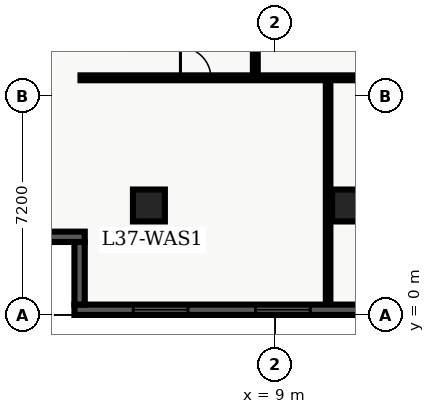
"""IFC4 building model, lengths in metres.
Left out: names, types, materials, properties, quantities, classifications, styles, units other than length and angle.
Written with IfcOpenShell. Run it as: python <this file> out.ifc"""

import sys

from ifc_helpers import new_model, entity, si_unit, converted_unit, direction, frame, origin_with_axes, origin_2d_with_axis, place, context, subcontext, project, spatial, polyline, rectangle, outline, extrude, element, fill, save


model = new_model("IFC4")
c1 = context("Model", 3, precision=1e-05, world=origin_with_axes(), true_north=direction((0.0, 1.0)))
c2 = subcontext(c1, "Body", "Model", "MODEL_VIEW")
j1 = project(units=[si_unit("LENGTHUNIT", "METRE"), converted_unit("PLANEANGLEUNIT", "DEGREE", entity("IfcPlaneAngleMeasure", 0.017), si_unit("PLANEANGLEUNIT", "RADIAN"), dimensions=[0, 0, 0, 0, 0, 0, 0])], contexts=[c1])
p1 = place(None, origin_with_axes())
s1 = spatial("IfcSite", under=j1, at=p1, CompositionType="ELEMENT")
p2 = place(p1, origin_with_axes())
s2 = spatial("IfcBuilding", under=s1, at=p2, CompositionType="ELEMENT")
p3 = place(p2, frame((0.0, 0.0, 152.4), z_axis=(0.0, 0.0, 1.0), x_axis=(1.0, 0.0, 0.0)))
s3 = spatial("IfcBuildingStorey", under=s2, at=p3, CompositionType="ELEMENT", Elevation=152.4)
for number, where, z_axis, x_axis in (
    (1, (11.4, 3.6, 0.0), (0.0, 0.0, 1.0), (1.0, 0.0, 0.0)),
    (2, (4.85, 3.6, 0.0), (0.0, 0.0, 1.0), (1.0, 0.0, 0.0)),
):
    element("IfcColumn", number, at=place(p3, frame(where, z_axis=z_axis, x_axis=x_axis)), inside=s3, PredefinedType="COLUMN", context=c2, shape_type="SweptSolid", body=[
        extrude(rectangle(XDim=1.05, YDim=1.05, at=origin_2d_with_axis()), origin_with_axes(), (0.0, 0.0, 1.0), 3.9),
    ])
p4 = place(p3, frame((2.6, 7.8, 0.0), z_axis=(0.0, 0.0, 1.0), x_axis=(1.0, 0.0, 0.0)))
e3 = element("IfcWall", 3, at=p4, inside=s3, PredefinedType="PARTITIONING", context=c2, shape_type="SweptSolid", body=[
    extrude(outline(polyline([(0.0, -0.08), (18.55, -0.08), (18.55, 0.08), (0.0, 0.08), (0.0, -0.08)])), origin_with_axes(), (0.0, 0.0, 1.0), 2.7),
])
p5 = place(p4, frame((3.787, 0.0, 0.0), z_axis=(0.0, 0.0, 1.0), x_axis=(1.0, 0.0, 0.0)))
e4 = element("IfcOpeningElement", 4, at=p5, cuts=e3, PredefinedType="OPENING", context=c2, shape_type="SweptSolid", body=[
    extrude(rectangle(XDim=1.0, YDim=0.18, at=origin_2d_with_axis()), origin_with_axes(), (0.0, 0.0, 1.0), 2.15),
])
p6 = place(p4, frame((13.322, 0.0, 0.0), z_axis=(0.0, 0.0, 1.0), x_axis=(1.0, 0.0, 0.0)))
e5 = element("IfcOpeningElement", 5, at=p6, cuts=e3, PredefinedType="OPENING", context=c2, shape_type="SweptSolid", body=[
    extrude(rectangle(XDim=1.0, YDim=0.18, at=origin_2d_with_axis()), origin_with_axes(), (0.0, 0.0, 1.0), 2.15),
])
p7 = place(p3, frame((8.35, 7.8, 0.0), z_axis=(0.0, 0.0, 1.0), x_axis=(0.0, 1.0, 0.0)))
e6 = element("IfcWall", 6, at=p7, inside=s3, PredefinedType="PARTITIONING", context=c2, shape_type="SweptSolid", body=[
    extrude(outline(polyline([(0.0, -0.08), (12.6, -0.08), (12.6, 0.08), (0.0, 0.08), (0.0, -0.08)])), origin_with_axes(), (0.0, 0.0, 1.0), 2.7),
])
p8 = place(p7, frame((2.92, 0.0, 0.0), z_axis=(0.0, 0.0, 1.0), x_axis=(1.0, 0.0, 0.0)))
e7 = element("IfcOpeningElement", 7, at=p8, cuts=e6, PredefinedType="OPENING", context=c2, shape_type="SweptSolid", body=[
    extrude(rectangle(XDim=1.0, YDim=0.18, at=origin_2d_with_axis()), origin_with_axes(), (0.0, 0.0, 1.0), 2.15),
])
p9 = place(p7, frame((9.115, 0.0, 0.0), z_axis=(0.0, 0.0, 1.0), x_axis=(1.0, 0.0, 0.0)))
e8 = element("IfcOpeningElement", 8, at=p9, cuts=e6, PredefinedType="OPENING", context=c2, shape_type="SweptSolid", body=[
    extrude(rectangle(XDim=1.0, YDim=0.18, at=origin_2d_with_axis()), origin_with_axes(), (0.0, 0.0, 1.0), 2.15),
])
p10 = place(p3, frame((10.744, 0.335, 0.0), z_axis=(0.0, 0.0, 1.0), x_axis=(0.0, 1.0, 0.0)))
e9 = element("IfcWall", 9, at=p10, inside=s3, PredefinedType="PARTITIONING", context=c2, shape_type="SweptSolid", body=[
    extrude(outline(polyline([(0.0, -0.075), (7.365, -0.075), (7.365, 0.075), (0.0, 0.075), (0.0, -0.075)])), origin_with_axes(), (0.0, 0.0, 1.0), 2.7),
])
p11 = place(p3, frame((57.26, 0.17, 0.0), z_axis=(0.0, 0.0, 1.0), x_axis=(-1.0, 0.0, 0.0)))
e10 = element("IfcWall", 10, at=p11, inside=s3, PredefinedType="SOLIDWALL", context=c2, shape_type="SweptSolid", body=[
    extrude(outline(polyline([(0.0, -0.17), (54.86, -0.17), (54.86, 0.17), (0.0, 0.17), (0.0, -0.17)])), origin_with_axes(), (0.0, 0.0, 1.0), 3.66),
])
p12 = place(p11, frame((2.836, 0.0, 0.45), z_axis=(0.0, 0.0, 1.0), x_axis=(1.0, 0.0, 0.0)))
e11 = element("IfcOpeningElement", 11, at=p12, cuts=e10, PredefinedType="OPENING", context=c2, shape_type="SweptSolid", body=[
    extrude(rectangle(XDim=1.8, YDim=0.36, at=origin_2d_with_axis()), origin_with_axes(), (0.0, 0.0, 1.0), 2.1),
])
p13 = place(p11, frame((7.307, 0.0, 0.45), z_axis=(0.0, 0.0, 1.0), x_axis=(1.0, 0.0, 0.0)))
e12 = element("IfcOpeningElement", 12, at=p13, cuts=e10, PredefinedType="OPENING", context=c2, shape_type="SweptSolid", body=[
    extrude(rectangle(XDim=1.8, YDim=0.36, at=origin_2d_with_axis()), origin_with_axes(), (0.0, 0.0, 1.0), 2.1),
])
p14 = place(p11, frame((11.779, 0.0, 0.45), z_axis=(0.0, 0.0, 1.0), x_axis=(1.0, 0.0, 0.0)))
e13 = element("IfcOpeningElement", 13, at=p14, cuts=e10, PredefinedType="OPENING", context=c2, shape_type="SweptSolid", body=[
    extrude(rectangle(XDim=1.8, YDim=0.36, at=origin_2d_with_axis()), origin_with_axes(), (0.0, 0.0, 1.0), 2.1),
])
p15 = place(p11, frame((16.251, 0.0, 0.45), z_axis=(0.0, 0.0, 1.0), x_axis=(1.0, 0.0, 0.0)))
e14 = element("IfcOpeningElement", 14, at=p15, cuts=e10, PredefinedType="OPENING", context=c2, shape_type="SweptSolid", body=[
    extrude(rectangle(XDim=1.8, YDim=0.36, at=origin_2d_with_axis()), origin_with_axes(), (0.0, 0.0, 1.0), 2.1),
])
p16 = place(p11, frame((20.723, 0.0, 0.45), z_axis=(0.0, 0.0, 1.0), x_axis=(1.0, 0.0, 0.0)))
e15 = element("IfcOpeningElement", 15, at=p16, cuts=e10, PredefinedType="OPENING", context=c2, shape_type="SweptSolid", body=[
    extrude(rectangle(XDim=1.8, YDim=0.36, at=origin_2d_with_axis()), origin_with_axes(), (0.0, 0.0, 1.0), 2.1),
])
p17 = place(p11, frame((25.194, 0.0, 0.45), z_axis=(0.0, 0.0, 1.0), x_axis=(1.0, 0.0, 0.0)))
e16 = element("IfcOpeningElement", 16, at=p17, cuts=e10, PredefinedType="OPENING", context=c2, shape_type="SweptSolid", body=[
    extrude(rectangle(XDim=1.8, YDim=0.36, at=origin_2d_with_axis()), origin_with_axes(), (0.0, 0.0, 1.0), 2.1),
])
p18 = place(p11, frame((29.666, 0.0, 0.45), z_axis=(0.0, 0.0, 1.0), x_axis=(1.0, 0.0, 0.0)))
e17 = element("IfcOpeningElement", 17, at=p18, cuts=e10, PredefinedType="OPENING", context=c2, shape_type="SweptSolid", body=[
    extrude(rectangle(XDim=1.8, YDim=0.36, at=origin_2d_with_axis()), origin_with_axes(), (0.0, 0.0, 1.0), 2.1),
])
p19 = place(p11, frame((34.138, 0.0, 0.45), z_axis=(0.0, 0.0, 1.0), x_axis=(1.0, 0.0, 0.0)))
e18 = element("IfcOpeningElement", 18, at=p19, cuts=e10, PredefinedType="OPENING", context=c2, shape_type="SweptSolid", body=[
    extrude(rectangle(XDim=1.8, YDim=0.36, at=origin_2d_with_axis()), origin_with_axes(), (0.0, 0.0, 1.0), 2.1),
])
p20 = place(p11, frame((38.609, 0.0, 0.45), z_axis=(0.0, 0.0, 1.0), x_axis=(1.0, 0.0, 0.0)))
e19 = element("IfcOpeningElement", 19, at=p20, cuts=e10, PredefinedType="OPENING", context=c2, shape_type="SweptSolid", body=[
    extrude(rectangle(XDim=1.8, YDim=0.36, at=origin_2d_with_axis()), origin_with_axes(), (0.0, 0.0, 1.0), 2.1),
])
p21 = place(p11, frame((43.081, 0.0, 0.45), z_axis=(0.0, 0.0, 1.0), x_axis=(1.0, 0.0, 0.0)))
e20 = element("IfcOpeningElement", 20, at=p21, cuts=e10, PredefinedType="OPENING", context=c2, shape_type="SweptSolid", body=[
    extrude(rectangle(XDim=1.8, YDim=0.36, at=origin_2d_with_axis()), origin_with_axes(), (0.0, 0.0, 1.0), 2.1),
])
p22 = place(p11, frame((48.003, 0.0, 0.45), z_axis=(0.0, 0.0, 1.0), x_axis=(1.0, 0.0, 0.0)))
e21 = element("IfcOpeningElement", 21, at=p22, cuts=e10, PredefinedType="OPENING", context=c2, shape_type="SweptSolid", body=[
    extrude(rectangle(XDim=1.8, YDim=0.36, at=origin_2d_with_axis()), origin_with_axes(), (0.0, 0.0, 1.0), 2.1),
])
p23 = place(p11, frame((52.024, 0.0, 0.45), z_axis=(0.0, 0.0, 1.0), x_axis=(1.0, 0.0, 0.0)))
e22 = element("IfcOpeningElement", 22, at=p23, cuts=e10, PredefinedType="OPENING", context=c2, shape_type="SweptSolid", body=[
    extrude(rectangle(XDim=1.8, YDim=0.36, at=origin_2d_with_axis()), origin_with_axes(), (0.0, 0.0, 1.0), 2.1),
])
p24 = place(p3, frame((2.57, 0.34, 0.0), z_axis=(0.0, 0.0, 1.0), x_axis=(0.0, 1.0, 0.0)))
e23 = element("IfcWall", 23, at=p24, inside=s3, PredefinedType="SOLIDWALL", context=c2, shape_type="SweptSolid", body=[
    extrude(outline(polyline([(0.0, -0.17), (2.06, -0.17), (2.06, 0.17), (0.0, 0.17), (0.0, -0.17)])), origin_with_axes(), (0.0, 0.0, 1.0), 3.66),
])
p25 = place(p3, frame((2.74, 2.57, 0.0), z_axis=(0.0, 0.0, 1.0), x_axis=(-1.0, 0.0, 0.0)))
e24 = element("IfcWall", 24, at=p25, inside=s3, PredefinedType="SOLIDWALL", context=c2, shape_type="SweptSolid", body=[
    extrude(outline(polyline([(0.0, -0.17), (2.74, -0.17), (2.74, 0.17), (0.0, 0.17), (0.0, -0.17)])), origin_with_axes(), (0.0, 0.0, 1.0), 3.66),
])
p26 = place(p4, frame((3.787, 0.0, 0.0), z_axis=(0.0, 0.0, 1.0), x_axis=(1.0, 0.0, 0.0)))
e25 = element("IfcDoor", 25, at=p26, inside=s3, OperationType="SINGLE_SWING_LEFT", PredefinedType="DOOR", context=c2, shape_type="SweptSolid", body=[
    extrude(rectangle(XDim=1.0, YDim=0.09, at=origin_2d_with_axis()), origin_with_axes(), (0.0, 0.0, 1.0), 2.15),
])
fill(e4, e25)
p27 = place(p11, frame((48.003, 0.0, 0.45), z_axis=(0.0, 0.0, 1.0), x_axis=(1.0, 0.0, 0.0)))
e26 = element("IfcWindow", 26, at=p27, inside=s3, PredefinedType="WINDOW", context=c2, shape_type="SweptSolid", body=[
    extrude(rectangle(XDim=1.8, YDim=0.09, at=origin_2d_with_axis()), origin_with_axes(), (0.0, 0.0, 1.0), 2.1),
])
fill(e21, e26)
p28 = place(p11, frame((52.024, 0.0, 0.45), z_axis=(0.0, 0.0, 1.0), x_axis=(1.0, 0.0, 0.0)))
e27 = element("IfcWindow", 27, at=p28, inside=s3, PredefinedType="WINDOW", context=c2, shape_type="SweptSolid", body=[
    extrude(rectangle(XDim=1.8, YDim=0.09, at=origin_2d_with_axis()), origin_with_axes(), (0.0, 0.0, 1.0), 2.1),
])
fill(e22, e27)
save(model, sys.argv[1])
